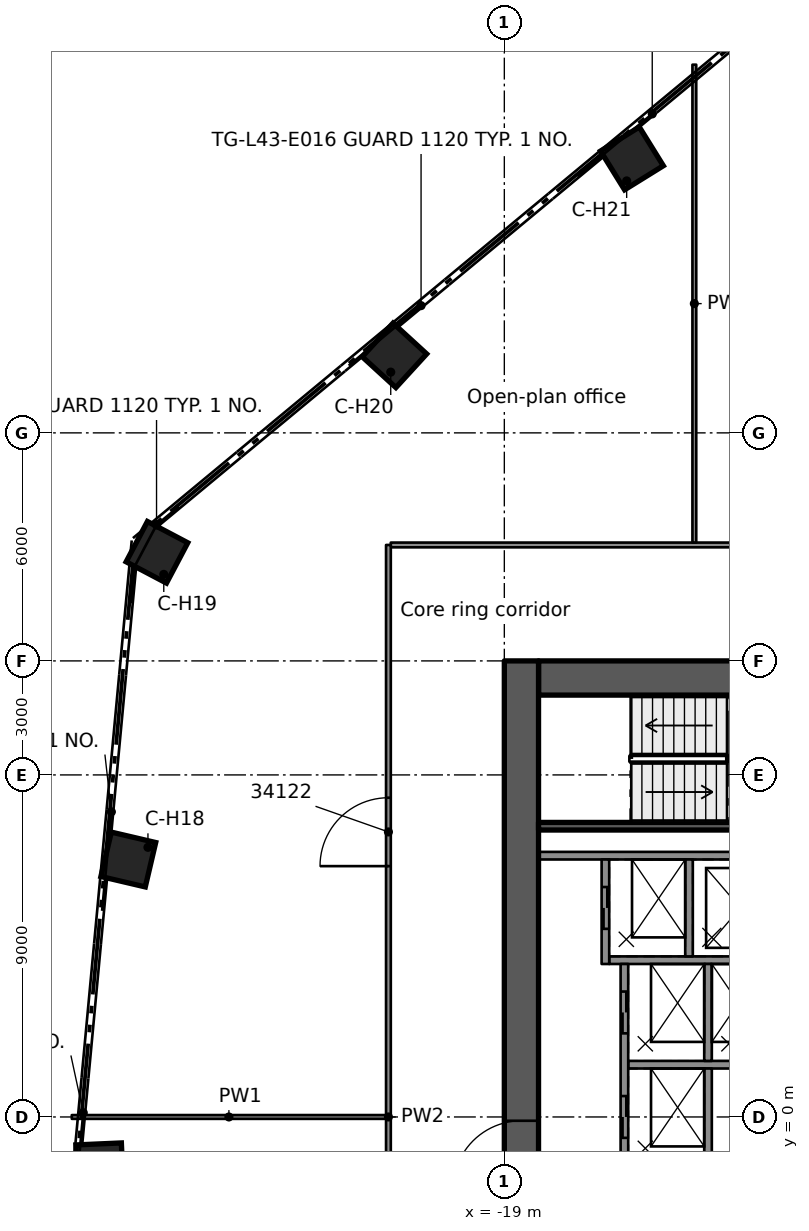
"""IFC4 building model, lengths in metres.
Left out: names, types, materials, properties, quantities, classifications, styles, units other than length and angle.
Written with IfcOpenShell. Run it as: python <this file> out.ifc"""

import sys

from ifc_helpers import new_model, si_unit, direction, frame, frame_2d, origin, origin_2d, place, context, subcontext, project, spatial, rectangle, extrude, element, fill, save


model = new_model("IFC4")
c1 = context("Model", 3, precision=1e-05, world=origin(), true_north=direction((0.0, 1.0)))
c2 = subcontext(c1, "Body", "Model", "MODEL_VIEW")
j1 = project(units=[si_unit("LENGTHUNIT", "METRE"), si_unit("PLANEANGLEUNIT", "RADIAN")], contexts=[c1])
p1 = place(None, origin())
s1 = spatial("IfcSite", under=j1, at=p1, CompositionType="ELEMENT")
p2 = place(p1, origin())
s2 = spatial("IfcBuilding", under=s1, at=p2, CompositionType="ELEMENT")
p3 = place(p2, frame((0.0, 0.0, 167.1)))
s3 = spatial("IfcBuildingStorey", under=s2, at=p3, CompositionType="ELEMENT", Elevation=167.1)
p4 = place(p3, frame((-18.1, 11.55, 0.0), z_axis=(0.0, 0.0, 1.0), x_axis=(1.0, 0.0, 0.0)))
e1 = element("IfcWall", 1, at=p4, inside=s3, PredefinedType="SHEAR", context=c2, shape_type="SweptSolid", body=[
    extrude(rectangle(XDim=9.2, YDim=0.9, at=frame_2d((4.6, 0.0))), origin(), (0.0, 0.0, 1.0), 3.5),
])
p5 = place(p4, frame((5.1, 0.0, 0.0)))
e2 = element("IfcOpeningElement", 2, at=p5, cuts=e1, PredefinedType="OPENING", context=c2, shape_type="SweptSolid", body=[
    extrude(rectangle(XDim=1.1, YDim=2.1, at=frame_2d((0.55, 1.05))), frame((0.0, 0.46, 0.0), z_axis=(0.0, -1.0, 0.0), x_axis=(1.0, 0.0, 0.0)), (0.0, 0.0, 1.0), 0.92),
])
p6 = place(p3, frame((-18.55, -12.0, 0.0), z_axis=(0.0, 0.0, 1.0), x_axis=(0.0, 1.0, 0.0)))
e3 = element("IfcWall", 3, at=p6, inside=s3, PredefinedType="SHEAR", context=c2, shape_type="SweptSolid", body=[
    extrude(rectangle(XDim=24.0, YDim=0.9, at=frame_2d((12.0, 0.0))), origin(), (0.0, 0.0, 1.0), 3.5),
])
p7 = place(p6, frame((10.1, 0.0, 0.0)))
e4 = element("IfcOpeningElement", 4, at=p7, cuts=e3, PredefinedType="OPENING", context=c2, shape_type="SweptSolid", body=[
    extrude(rectangle(XDim=1.8, YDim=2.1, at=frame_2d((0.9, 1.05))), frame((0.0, 0.46, 0.0), z_axis=(0.0, -1.0, 0.0), x_axis=(1.0, 0.0, 0.0)), (0.0, 0.0, 1.0), 0.92),
])
for number, where, z_axis, x_axis in (
    (5, (-29.65, -1.309, 0.0), (0.0, 0.0, 1.0), (-0.999, -0.044, 0.0)),
    (6, (-28.895, 6.774, 0.0), (0.0, 0.0, 1.0), (-0.974, 0.228, 0.0)),
    (7, (-28.141, 14.858, 0.0), (0.0, 0.0, 1.0), (-0.884, 0.467, 0.0)),
    (8, (-21.891, 20.04, 0.0), (0.0, 0.0, 1.0), (-0.738, 0.675, 0.0)),
    (9, (-15.642, 25.222, 0.0), (0.0, 0.0, 1.0), (-0.527, 0.85, 0.0)),
):
    element("IfcColumn", number, at=place(p3, frame(where, z_axis=z_axis, x_axis=x_axis)), inside=s3, PredefinedType="COLUMN", context=c2, shape_type="SweptSolid", body=[
        extrude(rectangle(XDim=1.2, YDim=1.2, at=origin_2d()), origin(), (0.0, 0.0, 1.0), 3.5),
    ])
p8 = place(p3, frame((-11.54, 6.875, 0.0), z_axis=(0.0, 0.0, 1.0), x_axis=(-1.0, 0.0, 0.0)))
e10 = element("IfcWall", 10, at=p8, inside=s3, PredefinedType="SOLIDWALL", context=c2, shape_type="SweptSolid", body=[
    extrude(rectangle(XDim=6.56, YDim=0.2, at=frame_2d((3.28, 0.0))), origin(), (0.0, 0.0, 1.0), 3.08),
])
p9 = place(p3, frame((-11.54, 1.375, 0.0), z_axis=(0.0, 0.0, 1.0), x_axis=(-1.0, 0.0, 0.0)))
e11 = element("IfcWall", 11, at=p9, inside=s3, PredefinedType="SOLIDWALL", context=c2, shape_type="SweptSolid", body=[
    extrude(rectangle(XDim=4.2, YDim=0.2, at=frame_2d((2.1, 0.0))), origin(), (0.0, 0.0, 1.0), 3.08),
])
p10 = place(p3, frame((-11.54, 4.125, 0.0), z_axis=(0.0, 0.0, 1.0), x_axis=(-1.0, 0.0, 0.0)))
e12 = element("IfcWall", 12, at=p10, inside=s3, PredefinedType="SOLIDWALL", context=c2, shape_type="SweptSolid", body=[
    extrude(rectangle(XDim=4.7, YDim=0.2, at=frame_2d((2.35, 0.0))), origin(), (0.0, 0.0, 1.0), 3.08),
])
p11 = place(p3, frame((-13.64, -4.025, 0.0), z_axis=(0.0, 0.0, 1.0), x_axis=(0.0, 1.0, 0.0)))
e13 = element("IfcWall", 13, at=p11, inside=s3, PredefinedType="SOLIDWALL", context=c2, shape_type="SweptSolid", body=[
    extrude(rectangle(XDim=5.3, YDim=0.2, at=frame_2d((2.65, 0.0))), origin(), (0.0, 0.0, 1.0), 3.08),
])
for number, where, z_axis, x_axis in (
    (14, (-13.64, 1.475, 0.0), (0.0, 0.0, 1.0), (0.0, 1.0, 0.0)),
    (15, (-14.14, 4.225, 0.0), (0.0, 0.0, 1.0), (0.0, 1.0, 0.0)),
):
    element("IfcWall", number, at=place(p3, frame(where, z_axis=z_axis, x_axis=x_axis)), inside=s3, PredefinedType="SOLIDWALL", context=c2, shape_type="SweptSolid", body=[
        extrude(rectangle(XDim=2.55, YDim=0.2, at=frame_2d((1.275, 0.0))), origin(), (0.0, 0.0, 1.0), 3.08),
    ])
p12 = place(p3, frame((-15.84, -4.025, 0.0), z_axis=(0.0, 0.0, 1.0), x_axis=(0.0, 1.0, 0.0)))
e16 = element("IfcWall", 16, at=p12, inside=s3, PredefinedType="SOLIDWALL", context=c2, shape_type="SweptSolid", body=[
    extrude(rectangle(XDim=8.05, YDim=0.2, at=frame_2d((4.025, 0.0))), origin(), (0.0, 0.0, 1.0), 3.08),
])
p13 = place(p12, frame((3.475, 0.0, 0.0)))
e17 = element("IfcOpeningElement", 17, at=p13, cuts=e16, PredefinedType="OPENING", context=c2, shape_type="SweptSolid", body=[
    extrude(rectangle(XDim=1.1, YDim=2.1, at=frame_2d((0.55, 1.05))), frame((0.0, 0.11, 0.0), z_axis=(0.0, -1.0, 0.0), x_axis=(1.0, 0.0, 0.0)), (0.0, 0.0, 1.0), 0.22),
])
p14 = place(p12, frame((6.225, 0.0, 0.0)))
e18 = element("IfcOpeningElement", 18, at=p14, cuts=e16, PredefinedType="OPENING", context=c2, shape_type="SweptSolid", body=[
    extrude(rectangle(XDim=1.1, YDim=2.1, at=frame_2d((0.55, 1.05))), frame((0.0, 0.11, 0.0), z_axis=(0.0, -1.0, 0.0), x_axis=(1.0, 0.0, 0.0)), (0.0, 0.0, 1.0), 0.22),
])
p15 = place(p3, frame((-16.34, 4.025, 0.0), z_axis=(0.0, 0.0, 1.0), x_axis=(0.0, 1.0, 0.0)))
e19 = element("IfcWall", 19, at=p15, inside=s3, PredefinedType="SOLIDWALL", context=c2, shape_type="SweptSolid", body=[
    extrude(rectangle(XDim=2.75, YDim=0.2, at=frame_2d((1.375, 0.0))), origin(), (0.0, 0.0, 1.0), 3.08),
])
p16 = place(p15, frame((0.925, 0.0, 0.0)))
e20 = element("IfcOpeningElement", 20, at=p16, cuts=e19, PredefinedType="OPENING", context=c2, shape_type="SweptSolid", body=[
    extrude(rectangle(XDim=1.1, YDim=2.1, at=frame_2d((0.55, 1.05))), frame((0.0, 0.11, 0.0), z_axis=(0.0, -1.0, 0.0), x_axis=(1.0, 0.0, 0.0)), (0.0, 0.0, 1.0), 0.22),
])
p17 = place(p3, frame((-11.54, 7.65, 0.0), z_axis=(0.0, 0.0, 1.0), x_axis=(-1.0, 0.0, 0.0)))
e21 = element("IfcWall", 21, at=p17, inside=s3, PredefinedType="SOLIDWALL", context=c2, shape_type="SweptSolid", body=[
    extrude(rectangle(XDim=6.56, YDim=0.2, at=frame_2d((3.28, 0.0))), origin(), (0.0, 0.0, 1.0), 3.08),
])
p18 = place(p3, frame((-30.382, 0.0, 0.0), z_axis=(0.0, 0.0, 1.0), x_axis=(1.0, 0.0, 0.0)))
e22 = element("IfcWall", 22, at=p18, inside=s3, PredefinedType="PARTITIONING", context=c2, shape_type="SweptSolid", body=[
    extrude(rectangle(XDim=8.269, YDim=0.1, at=frame_2d((4.135, 0.0))), origin(), (0.0, 0.0, 1.0), 3.06),
])
p19 = place(p3, frame((-21.988, 15.051, 0.0), z_axis=(0.0, 0.0, 1.0), x_axis=(1.0, 0.0, 0.0)))
e23 = element("IfcWall", 23, at=p19, inside=s3, PredefinedType="PARTITIONING", context=c2, shape_type="SweptSolid", body=[
    extrude(rectangle(XDim=10.997, YDim=0.125, at=frame_2d((5.499, 0.0))), origin(), (0.0, 0.0, 1.0), 3.06),
])
p20 = place(p3, frame((-14.0, 15.114, 0.0), z_axis=(0.0, 0.0, 1.0), x_axis=(0.0, 1.0, 0.0)))
e24 = element("IfcWall", 24, at=p20, inside=s3, PredefinedType="PARTITIONING", context=c2, shape_type="SweptSolid", body=[
    extrude(rectangle(XDim=12.574, YDim=0.1, at=frame_2d((6.287, 0.0))), origin(), (0.0, 0.0, 1.0), 3.06),
])
p21 = place(p3, frame((-22.05, -15.051, 0.0), z_axis=(0.0, 0.0, 1.0), x_axis=(0.0, 1.0, 0.0)))
e25 = element("IfcWall", 25, at=p21, inside=s3, PredefinedType="PARTITIONING", context=c2, shape_type="SweptSolid", body=[
    extrude(rectangle(XDim=30.102, YDim=0.125, at=frame_2d((15.051, 0.0))), origin(), (0.0, 0.0, 1.0), 3.06),
])
p22 = place(p21, frame((6.6, 0.0, 0.0)))
e26 = element("IfcOpeningElement", 26, at=p22, cuts=e25, PredefinedType="OPENING", context=c2, shape_type="SweptSolid", body=[
    extrude(rectangle(XDim=1.8, YDim=2.1, at=frame_2d((0.9, 1.05))), frame((0.0, 0.073, 0.0), z_axis=(0.0, -1.0, 0.0), x_axis=(1.0, 0.0, 0.0)), (0.0, 0.0, 1.0), 0.145),
])
p23 = place(p21, frame((21.651, 0.0, 0.0)))
e27 = element("IfcOpeningElement", 27, at=p23, cuts=e25, PredefinedType="OPENING", context=c2, shape_type="SweptSolid", body=[
    extrude(rectangle(XDim=1.8, YDim=2.1, at=frame_2d((0.9, 1.05))), frame((0.0, 0.073, 0.0), z_axis=(0.0, -1.0, 0.0), x_axis=(1.0, 0.0, 0.0)), (0.0, 0.0, 1.0), 0.145),
])
p24 = place(p13, origin())
e28 = element("IfcDoor", 28, at=p24, inside=s3, OperationType="DOUBLE_DOOR_SLIDING", PredefinedType="DOOR", context=c2, shape_type="SweptSolid", body=[
    extrude(rectangle(XDim=1.1, YDim=2.1, at=frame_2d((0.55, 1.05))), frame((0.0, 0.025, 0.0), z_axis=(0.0, -1.0, 0.0), x_axis=(1.0, 0.0, 0.0)), (0.0, 0.0, 1.0), 0.05),
])
fill(e17, e28)
p25 = place(p14, origin())
e29 = element("IfcDoor", 29, at=p25, inside=s3, OperationType="DOUBLE_DOOR_SLIDING", PredefinedType="DOOR", context=c2, shape_type="SweptSolid", body=[
    extrude(rectangle(XDim=1.1, YDim=2.1, at=frame_2d((0.55, 1.05))), frame((0.0, 0.025, 0.0), z_axis=(0.0, -1.0, 0.0), x_axis=(1.0, 0.0, 0.0)), (0.0, 0.0, 1.0), 0.05),
])
fill(e18, e29)
p26 = place(p16, origin())
e30 = element("IfcDoor", 30, at=p26, inside=s3, OperationType="DOUBLE_DOOR_SLIDING", PredefinedType="DOOR", context=c2, shape_type="SweptSolid", body=[
    extrude(rectangle(XDim=1.1, YDim=2.1, at=frame_2d((0.55, 1.05))), frame((0.0, 0.025, 0.0), z_axis=(0.0, -1.0, 0.0), x_axis=(1.0, 0.0, 0.0)), (0.0, 0.0, 1.0), 0.05),
])
fill(e20, e30)
p27 = place(p7, origin())
e31 = element("IfcDoor", 31, at=p27, inside=s3, OperationType="SINGLE_SWING_LEFT", PredefinedType="DOOR", context=c2, shape_type="SweptSolid", body=[
    extrude(rectangle(XDim=1.8, YDim=2.1, at=frame_2d((0.9, 1.05))), frame((0.0, 0.025, 0.0), z_axis=(0.0, -1.0, 0.0), x_axis=(1.0, 0.0, 0.0)), (0.0, 0.0, 1.0), 0.05),
])
fill(e4, e31)
p28 = place(p23, origin())
e32 = element("IfcDoor", 32, at=p28, inside=s3, OperationType="DOUBLE_DOOR_SINGLE_SWING", PredefinedType="DOOR", context=c2, shape_type="SweptSolid", body=[
    extrude(rectangle(XDim=1.8, YDim=2.1, at=frame_2d((0.9, 1.05))), frame((0.0, 0.025, 0.0), z_axis=(0.0, -1.0, 0.0), x_axis=(1.0, 0.0, 0.0)), (0.0, 0.0, 1.0), 0.05),
])
fill(e27, e32)
save(model, sys.argv[1])
